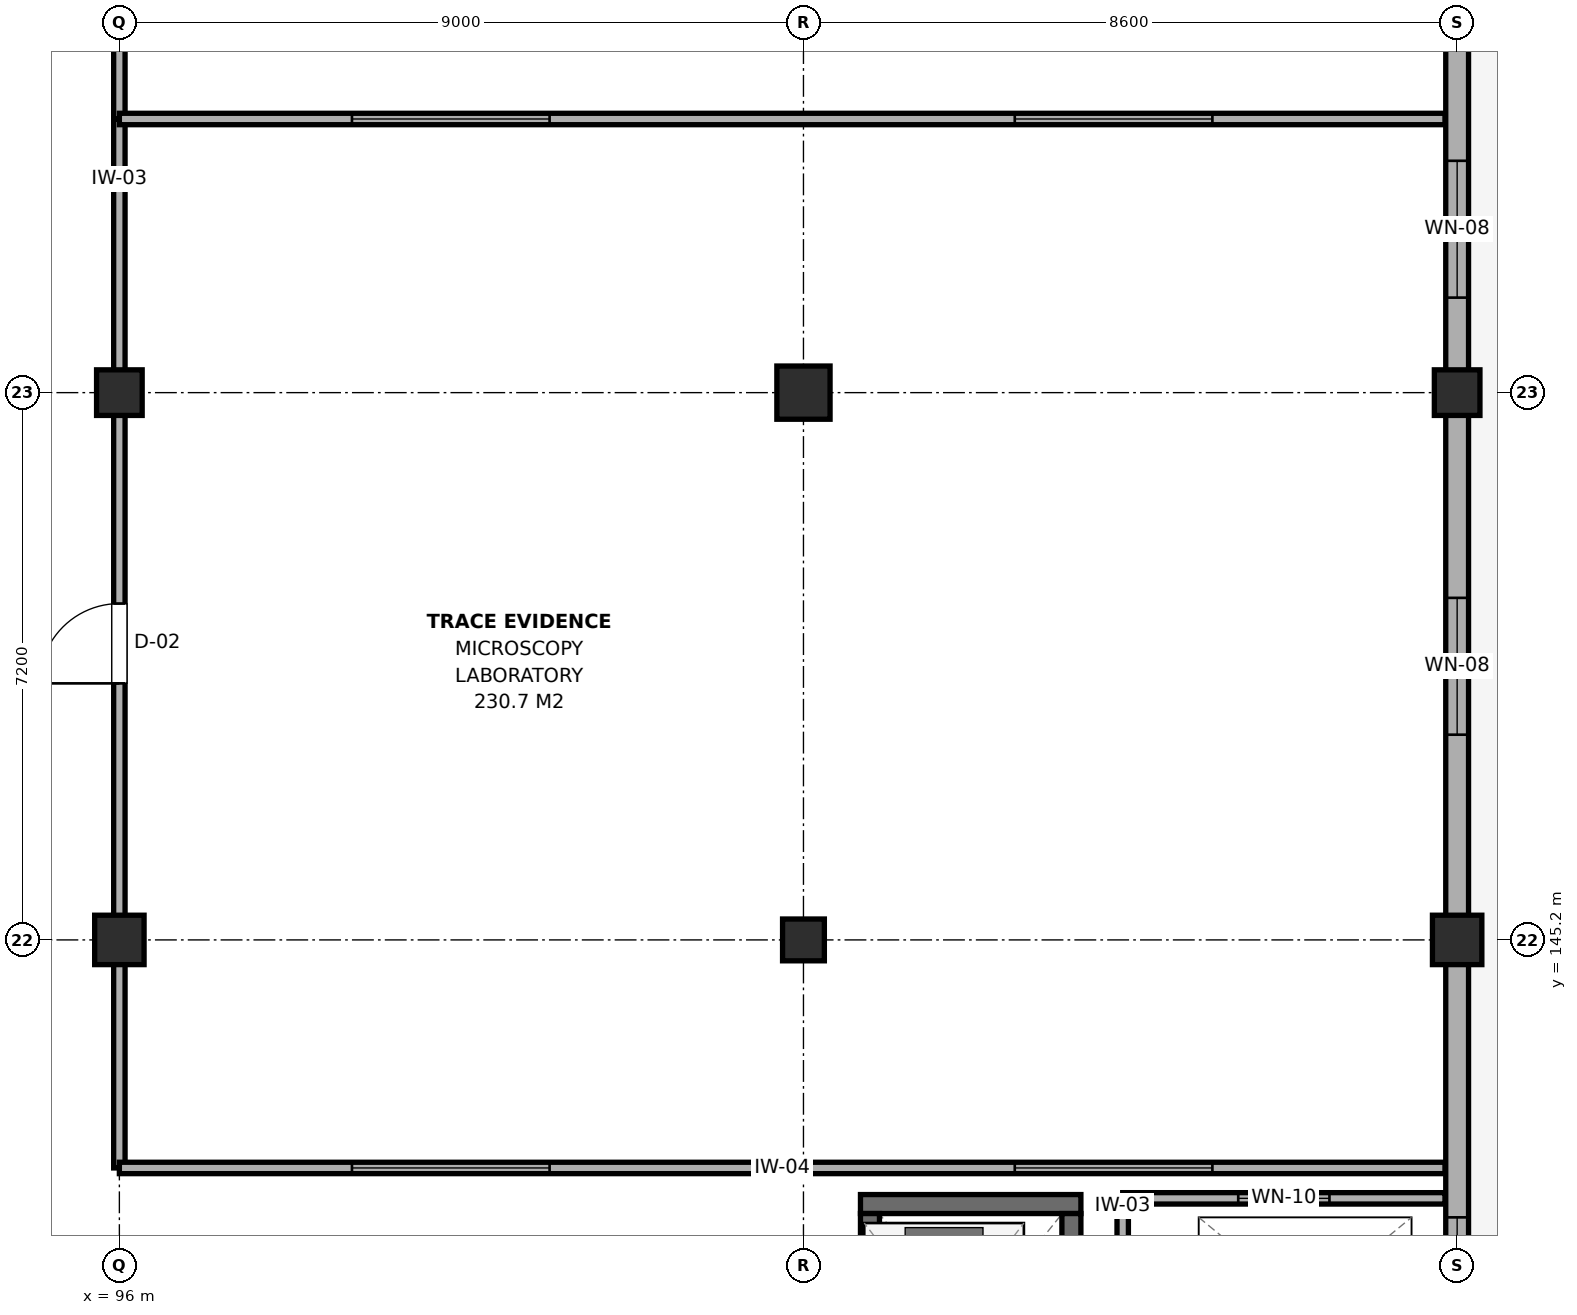
"""IFC4 building model, lengths in metres.
Left out: names, types, materials, properties, quantities, classifications, styles, units other than length and angle.
Written with IfcOpenShell. Run it as: python <this file> out.ifc"""

import sys

from ifc_helpers import new_model, si_unit, direction, frame, frame_2d, origin, origin_2d, place, context, subcontext, project, spatial, rectangle, extrude, element, fill, save


model = new_model("IFC4")
c1 = context("Model", 3, precision=1e-05, world=origin(), true_north=direction((0.0, 1.0)))
c2 = subcontext(c1, "Body", "Model", "MODEL_VIEW")
j1 = project(units=[si_unit("LENGTHUNIT", "METRE"), si_unit("PLANEANGLEUNIT", "RADIAN")], contexts=[c1])
p1 = place(None, origin())
s1 = spatial("IfcSite", under=j1, at=p1, CompositionType="ELEMENT")
p2 = place(p1, origin())
s2 = spatial("IfcBuilding", under=s1, at=p2, CompositionType="ELEMENT")
p3 = place(p2, frame((0.0, 0.0, 4.8)))
s3 = spatial("IfcBuildingStorey", under=s2, at=p3, CompositionType="ELEMENT", Elevation=4.8)
p4 = place(p3, frame((96.0, 145.2, 0.0), z_axis=(0.0, 0.0, 1.0), x_axis=(1.0, 0.0, 0.0)))
e1 = element("IfcColumn", 1, at=p4, inside=s3, PredefinedType="COLUMN", context=c2, shape_type="SweptSolid", body=[
    extrude(rectangle(XDim=0.65, YDim=0.65, at=origin_2d()), origin(), (0.0, 0.0, 1.0), 4.2),
])
p5 = place(p3, frame((96.0, 152.4, 0.0), z_axis=(0.0, 0.0, 1.0), x_axis=(1.0, 0.0, 0.0)))
e2 = element("IfcColumn", 2, at=p5, inside=s3, PredefinedType="COLUMN", context=c2, shape_type="SweptSolid", body=[
    extrude(rectangle(XDim=0.6, YDim=0.6, at=origin_2d()), origin(), (0.0, 0.0, 1.0), 4.2),
])
p6 = place(p3, frame((105.0, 145.2, 0.0), z_axis=(0.0, 0.0, 1.0), x_axis=(1.0, 0.0, 0.0)))
e3 = element("IfcColumn", 3, at=p6, inside=s3, PredefinedType="COLUMN", context=c2, shape_type="SweptSolid", body=[
    extrude(rectangle(XDim=0.55, YDim=0.55, at=origin_2d()), origin(), (0.0, 0.0, 1.0), 4.2),
])
p7 = place(p3, frame((105.0, 152.4, 0.0), z_axis=(0.0, 0.0, 1.0), x_axis=(1.0, 0.0, 0.0)))
e4 = element("IfcColumn", 4, at=p7, inside=s3, PredefinedType="COLUMN", context=c2, shape_type="SweptSolid", body=[
    extrude(rectangle(XDim=0.7, YDim=0.7, at=origin_2d()), origin(), (0.0, 0.0, 1.0), 4.2),
])
p8 = place(p3, frame((113.6, 145.2, 0.0), z_axis=(0.0, 0.0, 1.0), x_axis=(1.0, 0.0, 0.0)))
e5 = element("IfcColumn", 5, at=p8, inside=s3, PredefinedType="COLUMN", context=c2, shape_type="SweptSolid", body=[
    extrude(rectangle(XDim=0.65, YDim=0.65, at=origin_2d()), origin(), (0.0, 0.0, 1.0), 4.2),
])
p9 = place(p3, frame((113.6, 152.4, 0.0), z_axis=(0.0, 0.0, 1.0), x_axis=(1.0, 0.0, 0.0)))
e6 = element("IfcColumn", 6, at=p9, inside=s3, PredefinedType="COLUMN", context=c2, shape_type="SweptSolid", body=[
    extrude(rectangle(XDim=0.6, YDim=0.6, at=origin_2d()), origin(), (0.0, 0.0, 1.0), 4.2),
])
p10 = place(p3, frame((105.75, 141.725, 0.0), z_axis=(0.0, 0.0, 1.0), x_axis=(1.0, 0.0, 0.0)))
e7 = element("IfcWall", 7, at=p10, inside=s3, PredefinedType="SHEAR", context=c2, shape_type="SweptSolid", body=[
    extrude(rectangle(XDim=2.9, YDim=0.25, at=frame_2d((1.45, 0.0))), origin(), (0.0, 0.0, 1.0), 3.98),
])
p11 = place(p3, frame((105.875, 138.6, 0.0), z_axis=(0.0, 0.0, 1.0), x_axis=(0.0, 1.0, 0.0)))
e8 = element("IfcWall", 8, at=p11, inside=s3, PredefinedType="SHEAR", context=c2, shape_type="SweptSolid", body=[
    extrude(rectangle(XDim=3.0, YDim=0.25, at=frame_2d((1.5, 0.0))), origin(), (0.0, 0.0, 1.0), 3.98),
])
p12 = place(p11, frame((0.925, 0.0, 0.0)))
e9 = element("IfcOpeningElement", 9, at=p12, cuts=e8, PredefinedType="OPENING", context=c2, shape_type="SweptSolid", body=[
    extrude(rectangle(XDim=1.15, YDim=2.15, at=frame_2d((0.575, 1.075))), frame((0.0, 0.14, 0.0), z_axis=(0.0, -1.0, 0.0), x_axis=(1.0, 0.0, 0.0)), (0.0, 0.0, 1.0), 0.28),
])
p13 = place(p3, frame((108.525, 138.6, 0.0), z_axis=(0.0, 0.0, 1.0), x_axis=(0.0, 1.0, 0.0)))
e10 = element("IfcWall", 10, at=p13, inside=s3, PredefinedType="SHEAR", context=c2, shape_type="SweptSolid", body=[
    extrude(rectangle(XDim=3.0, YDim=0.25, at=frame_2d((1.5, 0.0))), origin(), (0.0, 0.0, 1.0), 3.98),
])
p14 = place(p3, frame((113.6, 138.0, 0.0), z_axis=(0.0, 0.0, 1.0), x_axis=(0.0, 1.0, 0.0)))
e11 = element("IfcWall", 11, at=p14, inside=s3, PredefinedType="SOLIDWALL", context=c2, shape_type="SweptSolid", body=[
    extrude(rectangle(XDim=7.2, YDim=0.3, at=frame_2d((3.6, 0.0))), origin(), (0.0, 0.0, 1.0), 3.625),
])
p15 = place(p14, frame((1.75, 0.0, 1.1)))
e12 = element("IfcOpeningElement", 12, at=p15, cuts=e11, PredefinedType="OPENING", context=c2, shape_type="SweptSolid", body=[
    extrude(rectangle(XDim=1.8, YDim=1.2, at=frame_2d((0.9, 0.6))), frame((0.0, 0.165, 0.0), z_axis=(0.0, -1.0, 0.0), x_axis=(1.0, 0.0, 0.0)), (0.0, 0.0, 1.0), 0.33),
])
p16 = place(p3, frame((113.6, 145.2, 0.0), z_axis=(0.0, 0.0, 1.0), x_axis=(0.0, 1.0, 0.0)))
e13 = element("IfcWall", 13, at=p16, inside=s3, PredefinedType="SOLIDWALL", context=c2, shape_type="SweptSolid", body=[
    extrude(rectangle(XDim=7.2, YDim=0.3, at=frame_2d((3.6, 0.0))), origin(), (0.0, 0.0, 1.0), 3.645),
])
p17 = place(p16, frame((2.7, 0.0, 1.1)))
e14 = element("IfcOpeningElement", 14, at=p17, cuts=e13, PredefinedType="OPENING", context=c2, shape_type="SweptSolid", body=[
    extrude(rectangle(XDim=1.8, YDim=1.2, at=frame_2d((0.9, 0.6))), frame((0.0, 0.165, 0.0), z_axis=(0.0, -1.0, 0.0), x_axis=(1.0, 0.0, 0.0)), (0.0, 0.0, 1.0), 0.33),
])
p18 = place(p3, frame((113.6, 152.4, 0.0), z_axis=(0.0, 0.0, 1.0), x_axis=(0.0, 1.0, 0.0)))
e15 = element("IfcWall", 15, at=p18, inside=s3, PredefinedType="SOLIDWALL", context=c2, shape_type="SweptSolid", body=[
    extrude(rectangle(XDim=7.2, YDim=0.3, at=frame_2d((3.6, 0.0))), origin(), (0.0, 0.0, 1.0), 3.375),
])
p19 = place(p18, frame((1.25, 0.0, 1.1)))
e16 = element("IfcOpeningElement", 16, at=p19, cuts=e15, PredefinedType="OPENING", context=c2, shape_type="SweptSolid", body=[
    extrude(rectangle(XDim=1.8, YDim=1.2, at=frame_2d((0.9, 0.6))), frame((0.0, 0.165, 0.0), z_axis=(0.0, -1.0, 0.0), x_axis=(1.0, 0.0, 0.0)), (0.0, 0.0, 1.0), 0.33),
])
p20 = place(p3, frame((109.2, 141.8, 0.0), z_axis=(0.0, 0.0, 1.0), x_axis=(1.0, 0.0, 0.0)))
e17 = element("IfcWall", 17, at=p20, inside=s3, PredefinedType="PARTITIONING", context=c2, shape_type="SweptSolid", body=[
    extrude(rectangle(XDim=4.24, YDim=0.15, at=frame_2d((2.12, 0.0))), origin(), (0.0, 0.0, 1.0), 3.625),
])
p21 = place(p20, frame((1.52, 0.0, 0.95)))
e18 = element("IfcOpeningElement", 18, at=p21, cuts=e17, PredefinedType="OPENING", context=c2, shape_type="SweptSolid", body=[
    extrude(rectangle(XDim=1.2, YDim=1.5, at=frame_2d((0.6, 0.75))), frame((0.0, 0.09, 0.0), z_axis=(0.0, -1.0, 0.0), x_axis=(1.0, 0.0, 0.0)), (0.0, 0.0, 1.0), 0.18),
])
p22 = place(p3, frame((109.2, 139.0, 0.0), z_axis=(0.0, 0.0, 1.0), x_axis=(0.0, 1.0, 0.0)))
e19 = element("IfcWall", 19, at=p22, inside=s3, PredefinedType="PARTITIONING", context=c2, shape_type="SweptSolid", body=[
    extrude(rectangle(XDim=2.8, YDim=0.15, at=frame_2d((1.4, 0.0))), origin(), (0.0, 0.0, 1.0), 3.975),
])
p23 = place(p22, frame((0.975, 0.0, 0.0)))
e20 = element("IfcOpeningElement", 20, at=p23, cuts=e19, PredefinedType="OPENING", context=c2, shape_type="SweptSolid", body=[
    extrude(rectangle(XDim=0.85, YDim=2.1, at=frame_2d((0.425, 1.05))), frame((0.0, 0.09, 0.0), z_axis=(0.0, -1.0, 0.0), x_axis=(1.0, 0.0, 0.0)), (0.0, 0.0, 1.0), 0.18),
])
p24 = place(p3, frame((96.0, 142.2, 0.0), z_axis=(0.0, 0.0, 1.0), x_axis=(0.0, 1.0, 0.0)))
e21 = element("IfcWall", 21, at=p24, inside=s3, PredefinedType="PARTITIONING", context=c2, shape_type="SweptSolid", body=[
    extrude(rectangle(XDim=13.8, YDim=0.15, at=frame_2d((6.9, 0.0))), origin(), (0.0, 0.0, 1.0), 3.375),
])
p25 = place(p24, frame((6.375, 0.0, 0.0)))
e22 = element("IfcOpeningElement", 22, at=p25, cuts=e21, PredefinedType="OPENING", context=c2, shape_type="SweptSolid", body=[
    extrude(rectangle(XDim=1.05, YDim=2.15, at=frame_2d((0.525, 1.075))), frame((0.0, 0.09, 0.0), z_axis=(0.0, -1.0, 0.0), x_axis=(1.0, 0.0, 0.0)), (0.0, 0.0, 1.0), 0.18),
])
p26 = place(p3, frame((96.0, 142.2, 0.0), z_axis=(0.0, 0.0, 1.0), x_axis=(1.0, 0.0, 0.0)))
e23 = element("IfcWall", 23, at=p26, inside=s3, PredefinedType="PARTITIONING", context=c2, shape_type="SweptSolid", body=[
    extrude(rectangle(XDim=17.44, YDim=0.15, at=frame_2d((8.72, 0.0))), origin(), (0.0, 0.0, 1.0), 3.425),
])
p27 = place(p26, frame((3.06, 0.0, 0.95)))
e24 = element("IfcOpeningElement", 24, at=p27, cuts=e23, PredefinedType="OPENING", context=c2, shape_type="SweptSolid", body=[
    extrude(rectangle(XDim=2.6, YDim=1.5, at=frame_2d((1.3, 0.75))), frame((0.0, 0.09, 0.0), z_axis=(0.0, -1.0, 0.0), x_axis=(1.0, 0.0, 0.0)), (0.0, 0.0, 1.0), 0.18),
])
p28 = place(p26, frame((11.78, 0.0, 0.95)))
e25 = element("IfcOpeningElement", 25, at=p28, cuts=e23, PredefinedType="OPENING", context=c2, shape_type="SweptSolid", body=[
    extrude(rectangle(XDim=2.6, YDim=1.5, at=frame_2d((1.3, 0.75))), frame((0.0, 0.09, 0.0), z_axis=(0.0, -1.0, 0.0), x_axis=(1.0, 0.0, 0.0)), (0.0, 0.0, 1.0), 0.18),
])
p29 = place(p3, frame((96.0, 156.0, 0.0), z_axis=(0.0, 0.0, 1.0), x_axis=(0.0, 1.0, 0.0)))
e26 = element("IfcWall", 26, at=p29, inside=s3, PredefinedType="PARTITIONING", context=c2, shape_type="SweptSolid", body=[
    extrude(rectangle(XDim=6.447, YDim=0.15, at=frame_2d((3.224, 0.0))), origin(), (0.0, 0.0, 1.0), 3.375),
])
p30 = place(p29, frame((2.299, 0.0, 0.0)))
e27 = element("IfcOpeningElement", 27, at=p30, cuts=e26, PredefinedType="OPENING", context=c2, shape_type="SweptSolid", body=[
    extrude(rectangle(XDim=0.95, YDim=2.15, at=frame_2d((0.475, 1.075))), frame((0.0, 0.09, 0.0), z_axis=(0.0, -1.0, 0.0), x_axis=(1.0, 0.0, 0.0)), (0.0, 0.0, 1.0), 0.18),
])
p31 = place(p3, frame((96.0, 156.0, 0.0), z_axis=(0.0, 0.0, 1.0), x_axis=(1.0, 0.0, 0.0)))
e28 = element("IfcWall", 28, at=p31, inside=s3, PredefinedType="PARTITIONING", context=c2, shape_type="SweptSolid", body=[
    extrude(rectangle(XDim=17.44, YDim=0.15, at=frame_2d((8.72, 0.0))), origin(), (0.0, 0.0, 1.0), 3.375),
])
p32 = place(p31, frame((3.06, 0.0, 0.95)))
e29 = element("IfcOpeningElement", 29, at=p32, cuts=e28, PredefinedType="OPENING", context=c2, shape_type="SweptSolid", body=[
    extrude(rectangle(XDim=2.6, YDim=1.5, at=frame_2d((1.3, 0.75))), frame((0.0, 0.09, 0.0), z_axis=(0.0, -1.0, 0.0), x_axis=(1.0, 0.0, 0.0)), (0.0, 0.0, 1.0), 0.18),
])
p33 = place(p31, frame((11.78, 0.0, 0.95)))
e30 = element("IfcOpeningElement", 30, at=p33, cuts=e28, PredefinedType="OPENING", context=c2, shape_type="SweptSolid", body=[
    extrude(rectangle(XDim=2.6, YDim=1.5, at=frame_2d((1.3, 0.75))), frame((0.0, 0.09, 0.0), z_axis=(0.0, -1.0, 0.0), x_axis=(1.0, 0.0, 0.0)), (0.0, 0.0, 1.0), 0.18),
])
p34 = place(p15, origin())
e31 = element("IfcWindow", 31, at=p34, inside=s3, PartitioningType="SINGLE_PANEL", PredefinedType="WINDOW", context=c2, shape_type="SweptSolid", body=[
    extrude(rectangle(XDim=1.8, YDim=1.2, at=frame_2d((0.9, 0.6))), frame((0.0, 0.03, 0.0), z_axis=(0.0, -1.0, 0.0), x_axis=(1.0, 0.0, 0.0)), (0.0, 0.0, 1.0), 0.06),
])
fill(e12, e31)
p35 = place(p17, origin())
e32 = element("IfcWindow", 32, at=p35, inside=s3, PartitioningType="SINGLE_PANEL", PredefinedType="WINDOW", context=c2, shape_type="SweptSolid", body=[
    extrude(rectangle(XDim=1.8, YDim=1.2, at=frame_2d((0.9, 0.6))), frame((0.0, 0.03, 0.0), z_axis=(0.0, -1.0, 0.0), x_axis=(1.0, 0.0, 0.0)), (0.0, 0.0, 1.0), 0.06),
])
fill(e14, e32)
p36 = place(p19, origin())
e33 = element("IfcWindow", 33, at=p36, inside=s3, PartitioningType="SINGLE_PANEL", PredefinedType="WINDOW", context=c2, shape_type="SweptSolid", body=[
    extrude(rectangle(XDim=1.8, YDim=1.2, at=frame_2d((0.9, 0.6))), frame((0.0, 0.03, 0.0), z_axis=(0.0, -1.0, 0.0), x_axis=(1.0, 0.0, 0.0)), (0.0, 0.0, 1.0), 0.06),
])
fill(e16, e33)
p37 = place(p21, origin())
e34 = element("IfcWindow", 34, at=p37, inside=s3, PartitioningType="SINGLE_PANEL", PredefinedType="WINDOW", context=c2, shape_type="SweptSolid", body=[
    extrude(rectangle(XDim=1.2, YDim=1.5, at=frame_2d((0.6, 0.75))), frame((0.0, 0.03, 0.0), z_axis=(0.0, -1.0, 0.0), x_axis=(1.0, 0.0, 0.0)), (0.0, 0.0, 1.0), 0.06),
])
fill(e18, e34)
p38 = place(p25, origin())
e35 = element("IfcDoor", 35, at=p38, inside=s3, OperationType="SINGLE_SWING_LEFT", PredefinedType="DOOR", context=c2, shape_type="SweptSolid", body=[
    extrude(rectangle(XDim=1.05, YDim=2.15, at=frame_2d((0.525, 1.075))), frame((0.0, 0.025, 0.0), z_axis=(0.0, -1.0, 0.0), x_axis=(1.0, 0.0, 0.0)), (0.0, 0.0, 1.0), 0.05),
])
fill(e22, e35)
p39 = place(p27, origin())
e36 = element("IfcWindow", 36, at=p39, inside=s3, PartitioningType="SINGLE_PANEL", PredefinedType="WINDOW", context=c2, shape_type="SweptSolid", body=[
    extrude(rectangle(XDim=2.6, YDim=1.5, at=frame_2d((1.3, 0.75))), frame((0.0, 0.03, 0.0), z_axis=(0.0, -1.0, 0.0), x_axis=(1.0, 0.0, 0.0)), (0.0, 0.0, 1.0), 0.06),
])
fill(e24, e36)
p40 = place(p28, origin())
e37 = element("IfcWindow", 37, at=p40, inside=s3, PartitioningType="SINGLE_PANEL", PredefinedType="WINDOW", context=c2, shape_type="SweptSolid", body=[
    extrude(rectangle(XDim=2.6, YDim=1.5, at=frame_2d((1.3, 0.75))), frame((0.0, 0.03, 0.0), z_axis=(0.0, -1.0, 0.0), x_axis=(1.0, 0.0, 0.0)), (0.0, 0.0, 1.0), 0.06),
])
fill(e25, e37)
p41 = place(p32, origin())
e38 = element("IfcWindow", 38, at=p41, inside=s3, PartitioningType="SINGLE_PANEL", PredefinedType="WINDOW", context=c2, shape_type="SweptSolid", body=[
    extrude(rectangle(XDim=2.6, YDim=1.5, at=frame_2d((1.3, 0.75))), frame((0.0, 0.03, 0.0), z_axis=(0.0, -1.0, 0.0), x_axis=(1.0, 0.0, 0.0)), (0.0, 0.0, 1.0), 0.06),
])
fill(e29, e38)
p42 = place(p33, origin())
e39 = element("IfcWindow", 39, at=p42, inside=s3, PartitioningType="SINGLE_PANEL", PredefinedType="WINDOW", context=c2, shape_type="SweptSolid", body=[
    extrude(rectangle(XDim=2.6, YDim=1.5, at=frame_2d((1.3, 0.75))), frame((0.0, 0.03, 0.0), z_axis=(0.0, -1.0, 0.0), x_axis=(1.0, 0.0, 0.0)), (0.0, 0.0, 1.0), 0.06),
])
fill(e30, e39)
save(model, sys.argv[1])
